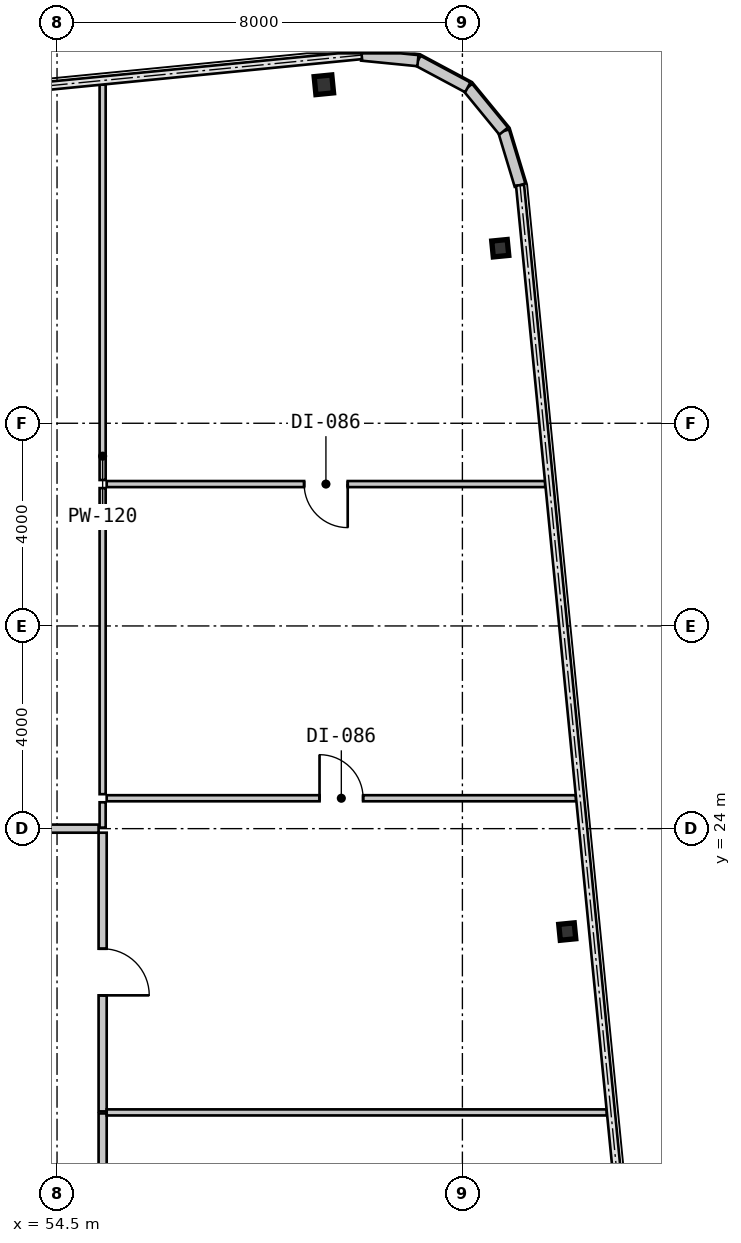
"""IFC4 building model, lengths in metres.
Left out: names, types, materials, properties, quantities, classifications, styles, units other than length and angle.
Written with IfcOpenShell. Run it as: python <this file> out.ifc"""

import sys

from ifc_helpers import new_model, si_unit, direction, frame, frame_2d, origin, origin_2d, place, context, subcontext, project, spatial, rectangle, i_section, extrude, source, transform, mapped, element, fill, save


model = new_model("IFC4")
c1 = context("Model", 3, precision=1e-05, world=origin(), true_north=direction((0.0, 1.0)))
c2 = subcontext(c1, "Body", "Model", "MODEL_VIEW")
j1 = project(units=[si_unit("LENGTHUNIT", "METRE"), si_unit("PLANEANGLEUNIT", "RADIAN")], contexts=[c1])
p1 = place(None, origin())
s1 = spatial("IfcSite", under=j1, at=p1, CompositionType="ELEMENT")
p2 = place(p1, origin())
s2 = spatial("IfcBuilding", under=s1, at=p2, CompositionType="ELEMENT")
p3 = place(p2, frame((0.0, 0.0, 74.55)))
s3 = spatial("IfcBuildingStorey", under=s2, at=p3, CompositionType="ELEMENT", Elevation=74.55)
m1 = source(origin(), c2, "Body", "SweptSolid", [
    extrude(i_section(OverallWidth=0.35, OverallDepth=0.356, WebThickness=0.018, FlangeThickness=0.028, at=origin_2d()), origin(), (0.0, 0.0, 1.0), 3.15),
])
p4 = place(p3, frame((59.766, 38.68, 0.0), z_axis=(0.0, 0.0, 1.0), x_axis=(0.995227399982, 0.097582899759, 0.0)))
e1 = element("IfcColumn", 1, at=p4, inside=s3, PredefinedType="COLUMN", context=c2, shape_type="MappedRepresentation", body=[
    mapped(m1, transform((0.0, 0.0, 0.0), scale=1.0)),
])
m2 = source(origin(), c2, "Body", "SweptSolid", [
    extrude(i_section(OverallWidth=0.307, OverallDepth=0.315, WebThickness=0.012, FlangeThickness=0.019, at=origin_2d()), origin(), (0.0, 0.0, 1.0), 3.15),
])
for number, where, z_axis, x_axis in (
    (2, (64.57, 21.969, 0.0), (0.0, 0.0, 1.0), (0.995, 0.098, 0.0)),
    (3, (63.247, 35.454, 0.0), (0.0, 0.0, 1.0), (0.995, 0.098, 0.0)),
):
    element("IfcColumn", number, at=place(p3, frame(where, z_axis=z_axis, x_axis=x_axis)), inside=s3, PredefinedType="COLUMN", context=c2, shape_type="MappedRepresentation", body=[
        mapped(m2, transform((0.0, 0.0, 0.0), scale=1.0)),
    ])
m3 = source(origin(), c2, "Body", "SweptSolid", [
    extrude(rectangle(XDim=1.116, YDim=0.22, at=frame_2d((0.558, 0.0))), origin(), (0.0, 0.0, 1.0), 2.93),
])
p5 = place(p3, frame((63.638, 36.698, 0.0), z_axis=(0.0, 0.0, 1.0), x_axis=(-0.289855603468, 0.957070388811, 0.0)))
e4 = element("IfcWall", 4, at=p5, inside=s3, PredefinedType="SOLIDWALL", context=c2, shape_type="MappedRepresentation", body=[
    mapped(m3, transform((0.0, 0.0, 0.0), scale=1.0)),
])
m4 = source(origin(), c2, "Body", "SweptSolid", [
    extrude(rectangle(XDim=1.116, YDim=0.22, at=frame_2d((0.558, 0.0))), origin(), (0.0, 0.0, 1.0), 2.93),
])
p6 = place(p3, frame((63.314, 37.766, 0.0), z_axis=(0.0, 0.0, 1.0), x_axis=(-0.634095287989, 0.773254916409, 0.0)))
e5 = element("IfcWall", 5, at=p6, inside=s3, PredefinedType="SOLIDWALL", context=c2, shape_type="MappedRepresentation", body=[
    mapped(m4, transform((0.0, 0.0, 0.0), scale=1.0)),
])
for number, where, z_axis, x_axis in (
    (6, (62.607, 38.629, 0.0), (0.0, 0.0, 1.0), (-0.882, 0.472, 0.0)),
    (7, (61.623, 39.156, 0.0), (0.0, 0.0, 1.0), (-0.995, 0.098, 0.0)),
):
    element("IfcWall", number, at=place(p3, frame(where, z_axis=z_axis, x_axis=x_axis)), inside=s3, PredefinedType="SOLIDWALL", context=c2, shape_type="MappedRepresentation", body=[
        mapped(m3, transform((0.0, 0.0, 0.0), scale=1.0)),
    ])
m5 = source(origin(), c2, "Body", "SweptSolid", [
    extrude(rectangle(XDim=6.36, YDim=0.16, at=frame_2d((3.18, 0.0))), origin(), (0.0, 0.0, 1.0), 2.93),
])
p7 = place(p3, frame((55.4, 18.38, 0.0), z_axis=(0.0, 0.0, 1.0), x_axis=(0.0, -1.0, 0.0)))
e8 = element("IfcWall", 8, at=p7, inside=s3, PredefinedType="PARTITIONING", context=c2, shape_type="MappedRepresentation", body=[
    mapped(m5, transform((0.0, 0.0, 0.0), scale=1.0)),
])
m6 = source(origin(), c2, "Body", "SweptSolid", [
    extrude(rectangle(XDim=0.92, YDim=2.1, at=frame_2d((0.46, 1.05))), frame((0.0, 0.09, 0.0), z_axis=(0.0, -1.0, 0.0), x_axis=(1.0, 0.0, 0.0)), (0.0, 0.0, 1.0), 0.18),
])
p8 = place(p7, frame((2.72, 0.0, 0.0)))
e9 = element("IfcOpeningElement", 9, at=p8, cuts=e8, PredefinedType="OPENING", context=c2, shape_type="MappedRepresentation", body=[
    mapped(m6, transform((0.0, 0.0, 0.0), scale=1.0)),
])
m7 = source(origin(), c2, "Body", "SweptSolid", [
    extrude(rectangle(XDim=5.5, YDim=0.16, at=frame_2d((2.75, 0.0))), origin(), (0.0, 0.0, 1.0), 2.93),
])
p9 = place(p3, frame((55.4, 23.92, 0.0), z_axis=(0.0, 0.0, 1.0), x_axis=(0.0, -1.0, 0.0)))
e10 = element("IfcWall", 10, at=p9, inside=s3, PredefinedType="PARTITIONING", context=c2, shape_type="MappedRepresentation", body=[
    mapped(m7, transform((0.0, 0.0, 0.0), scale=1.0)),
])
p10 = place(p9, frame((2.29, 0.0, 0.0)))
e11 = element("IfcOpeningElement", 11, at=p10, cuts=e10, PredefinedType="OPENING", context=c2, shape_type="MappedRepresentation", body=[
    mapped(m6, transform((0.0, 0.0, 0.0), scale=1.0)),
])
m8 = source(origin(), c2, "Body", "SweptSolid", [
    extrude(rectangle(XDim=3.016, YDim=0.16, at=frame_2d((1.508, 0.0))), origin(), (0.0, 0.0, 1.0), 2.93),
])
p11 = place(p3, frame((52.304, 24.0, 0.0), z_axis=(0.0, 0.0, 1.0), x_axis=(1.0, 0.0, 0.0)))
e12 = element("IfcWall", 12, at=p11, inside=s3, PredefinedType="PARTITIONING", context=c2, shape_type="MappedRepresentation", body=[
    mapped(m8, transform((0.0, 0.0, 0.0), scale=1.0)),
])
m9 = source(origin(), c2, "Body", "SweptSolid", [
    extrude(rectangle(XDim=9.869, YDim=0.12, at=frame_2d((4.935, 0.0))), origin(), (0.0, 0.0, 1.0), 2.93),
])
p12 = place(p3, frame((55.48, 18.4, 0.0), z_axis=(0.0, 0.0, 1.0), x_axis=(1.0, 0.0, 0.0)))
e13 = element("IfcWall", 13, at=p12, inside=s3, PredefinedType="PARTITIONING", context=c2, shape_type="MappedRepresentation", body=[
    mapped(m9, transform((0.0, 0.0, 0.0), scale=1.0)),
])
m10 = source(origin(), c2, "Body", "SweptSolid", [
    extrude(rectangle(XDim=9.261, YDim=0.12, at=frame_2d((4.631, 0.0))), origin(), (0.0, 0.0, 1.0), 2.93),
])
p13 = place(p3, frame((55.48, 24.6, 0.0), z_axis=(0.0, 0.0, 1.0), x_axis=(1.0, 0.0, 0.0)))
e14 = element("IfcWall", 14, at=p13, inside=s3, PredefinedType="PARTITIONING", context=c2, shape_type="MappedRepresentation", body=[
    mapped(m10, transform((0.0, 0.0, 0.0), scale=1.0)),
])
m11 = source(origin(), c2, "Body", "SweptSolid", [
    extrude(rectangle(XDim=0.86, YDim=2.1, at=frame_2d((0.43, 1.05))), frame((0.0, 0.07, 0.0), z_axis=(0.0, -1.0, 0.0), x_axis=(1.0, 0.0, 0.0)), (0.0, 0.0, 1.0), 0.14),
])
p14 = place(p13, frame((4.201, 0.0, 0.0)))
e15 = element("IfcOpeningElement", 15, at=p14, cuts=e14, PredefinedType="OPENING", context=c2, shape_type="MappedRepresentation", body=[
    mapped(m11, transform((0.0, 0.0, 0.0), scale=1.0)),
])
m12 = source(origin(), c2, "Body", "SweptSolid", [
    extrude(rectangle(XDim=0.5, YDim=0.12, at=frame_2d((0.25, 0.0))), origin(), (0.0, 0.0, 1.0), 2.93),
])
p15 = place(p3, frame((55.4, 24.02, 0.0), z_axis=(0.0, 0.0, 1.0), x_axis=(0.0, 1.0, 0.0)))
e16 = element("IfcWall", 16, at=p15, inside=s3, PredefinedType="PARTITIONING", context=c2, shape_type="MappedRepresentation", body=[
    mapped(m12, transform((0.0, 0.0, 0.0), scale=1.0)),
])
m13 = source(origin(), c2, "Body", "SweptSolid", [
    extrude(rectangle(XDim=8.653, YDim=0.12, at=frame_2d((4.327, 0.0))), origin(), (0.0, 0.0, 1.0), 2.93),
])
p16 = place(p3, frame((55.48, 30.8, 0.0), z_axis=(0.0, 0.0, 1.0), x_axis=(1.0, 0.0, 0.0)))
e17 = element("IfcWall", 17, at=p16, inside=s3, PredefinedType="PARTITIONING", context=c2, shape_type="MappedRepresentation", body=[
    mapped(m13, transform((0.0, 0.0, 0.0), scale=1.0)),
])
p17 = place(p16, frame((3.897, 0.0, 0.0)))
e18 = element("IfcOpeningElement", 18, at=p17, cuts=e17, PredefinedType="OPENING", context=c2, shape_type="MappedRepresentation", body=[
    mapped(m11, transform((0.0, 0.0, 0.0), scale=1.0)),
])
m14 = source(origin(), c2, "Body", "SweptSolid", [
    extrude(rectangle(XDim=6.04, YDim=0.12, at=frame_2d((3.02, 0.0))), origin(), (0.0, 0.0, 1.0), 2.93),
])
p18 = place(p3, frame((55.4, 24.68, 0.0), z_axis=(0.0, 0.0, 1.0), x_axis=(0.0, 1.0, 0.0)))
e19 = element("IfcWall", 19, at=p18, inside=s3, PredefinedType="PARTITIONING", context=c2, shape_type="MappedRepresentation", body=[
    mapped(m14, transform((0.0, 0.0, 0.0), scale=1.0)),
])
m15 = source(origin(), c2, "Body", "SweptSolid", [
    extrude(rectangle(XDim=7.802, YDim=0.12, at=frame_2d((3.901, 0.0))), origin(), (0.0, 0.0, 1.0), 2.93),
])
p19 = place(p3, frame((55.4, 30.88, 0.0), z_axis=(0.0, 0.0, 1.0), x_axis=(0.0, 1.0, 0.0)))
e20 = element("IfcWall", 20, at=p19, inside=s3, PredefinedType="PARTITIONING", context=c2, shape_type="MappedRepresentation", body=[
    mapped(m15, transform((0.0, 0.0, 0.0), scale=1.0)),
])
m16 = source(origin(), c2, "Body", "SweptSolid", [
    extrude(rectangle(XDim=0.92, YDim=2.1, at=frame_2d((0.46, 1.05))), frame((0.0, 0.025, 0.0), z_axis=(0.0, -1.0, 0.0), x_axis=(1.0, 0.0, 0.0)), (0.0, 0.0, 1.0), 0.05),
])
p20 = place(p10, origin())
e21 = element("IfcDoor", 21, at=p20, inside=s3, OperationType="SINGLE_SWING_RIGHT", PredefinedType="DOOR", context=c2, shape_type="MappedRepresentation", body=[
    mapped(m16, transform((0.0, 0.0, 0.0), scale=1.0)),
])
fill(e11, e21)
m17 = source(origin(), c2, "Body", "SweptSolid", [
    extrude(rectangle(XDim=0.86, YDim=2.1, at=frame_2d((0.43, 1.05))), frame((0.0, 0.025, 0.0), z_axis=(0.0, -1.0, 0.0), x_axis=(1.0, 0.0, 0.0)), (0.0, 0.0, 1.0), 0.05),
])
p21 = place(p14, origin())
e22 = element("IfcDoor", 22, at=p21, inside=s3, OperationType="SINGLE_SWING_LEFT", PredefinedType="DOOR", context=c2, shape_type="MappedRepresentation", body=[
    mapped(m17, transform((0.0, 0.0, 0.0), scale=1.0)),
])
fill(e15, e22)
p22 = place(p17, frame((0.86, 0.0, 0.0), z_axis=(0.0, 0.0, 1.0), x_axis=(-1.0, 0.0, 0.0)))
e23 = element("IfcDoor", 23, at=p22, inside=s3, OperationType="SINGLE_SWING_LEFT", PredefinedType="DOOR", context=c2, shape_type="MappedRepresentation", body=[
    mapped(m17, transform((0.0, 0.0, 0.0), scale=1.0)),
])
fill(e18, e23)
save(model, sys.argv[1])
